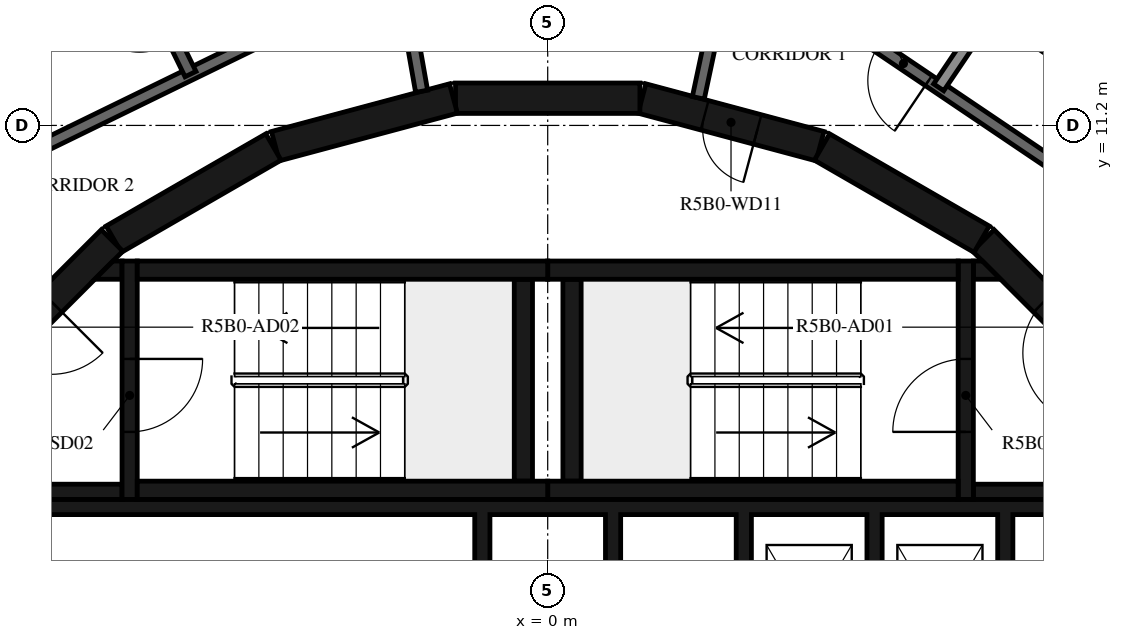
"""IFC4 building model, lengths in metres.
Left out: names, types, materials, properties, quantities, classifications, styles, units other than length and angle.
Written with IfcOpenShell. Run it as: python <this file> out.ifc"""

import sys

from ifc_helpers import new_model, si_unit, direction, frame, frame_2d, origin, place, context, subcontext, project, spatial, polyline, rectangle, outline, extrude, element, fill, save


model = new_model("IFC4")
c1 = context("Model", 3, precision=1e-05, world=origin(), true_north=direction((0.0, 1.0)))
c2 = subcontext(c1, "Body", "Model", "MODEL_VIEW")
j1 = project(units=[si_unit("LENGTHUNIT", "METRE"), si_unit("PLANEANGLEUNIT", "RADIAN")], contexts=[c1])
p1 = place(None, origin())
s1 = spatial("IfcSite", under=j1, at=p1, CompositionType="ELEMENT")
p2 = place(p1, origin())
s2 = spatial("IfcBuilding", under=s1, at=p2, CompositionType="ELEMENT")
p3 = place(p2, frame((0.0, 0.0, 202.4)))
s3 = spatial("IfcBuildingStorey", under=s2, at=p3, CompositionType="ELEMENT", Elevation=202.4)
p4 = place(p3, frame((9.308, 7.164, 0.0), z_axis=(0.0, 0.0, 1.0), x_axis=(-0.707106781187, 0.707106781187, 0.0)))
e1 = element("IfcWall", 1, at=p4, inside=s3, PredefinedType="SHEAR", context=c2, shape_type="SweptSolid", body=[
    extrude(rectangle(XDim=3.032, YDim=0.5, at=frame_2d((1.516, 0.0))), origin(), (0.0, 0.0, 1.0), 3.12),
])
p5 = place(p4, frame((0.416, 0.0, 0.0)))
e2 = element("IfcOpeningElement", 2, at=p5, cuts=e1, PredefinedType="OPENING", context=c2, shape_type="SweptSolid", body=[
    extrude(rectangle(XDim=1.2, YDim=2.1, at=frame_2d((0.6, 1.05))), frame((0.0, 0.26, 0.0), z_axis=(0.0, -1.0, 0.0), x_axis=(1.0, 0.0, 0.0)), (0.0, 0.0, 1.0), 0.52),
])
p6 = place(p3, frame((7.137, 9.329, 0.0), z_axis=(0.0, 0.0, 1.0), x_axis=(-0.865975092491, 0.500087131594, 0.0)))
e3 = element("IfcWall", 3, at=p6, inside=s3, PredefinedType="SHEAR", context=c2, shape_type="SweptSolid", body=[
    extrude(rectangle(XDim=3.033, YDim=0.5, at=frame_2d((1.516, 0.0))), origin(), (0.0, 0.0, 1.0), 3.12),
])
p7 = place(p3, frame((4.479, 10.858, 0.0), z_axis=(0.0, 0.0, 1.0), x_axis=(-0.965948410781, 0.258734743916, 0.0)))
e4 = element("IfcWall", 4, at=p7, inside=s3, PredefinedType="SHEAR", context=c2, shape_type="SweptSolid", body=[
    extrude(rectangle(XDim=3.033, YDim=0.5, at=frame_2d((1.516, 0.0))), origin(), (0.0, 0.0, 1.0), 3.12),
])
p8 = place(p7, frame((1.066, 0.0, 0.0)))
e5 = element("IfcOpeningElement", 5, at=p8, cuts=e4, PredefinedType="OPENING", context=c2, shape_type="SweptSolid", body=[
    extrude(rectangle(XDim=0.9, YDim=2.1, at=frame_2d((0.45, 1.05))), frame((0.0, 0.26, 0.0), z_axis=(0.0, -1.0, 0.0), x_axis=(1.0, 0.0, 0.0)), (0.0, 0.0, 1.0), 0.52),
])
for number, where, z_axis, x_axis in (
    (6, (1.516, 11.647, 0.0), (0.0, 0.0, 1.0), (-1.0, 0.0, 0.0)),
    (7, (-1.55, 11.643, 0.0), (0.0, 0.0, 1.0), (-0.966, -0.259, 0.0)),
    (8, (-4.51, 10.845, 0.0), (0.0, 0.0, 1.0), (-0.866, -0.5, 0.0)),
):
    element("IfcWall", number, at=place(p3, frame(where, z_axis=z_axis, x_axis=x_axis)), inside=s3, PredefinedType="SHEAR", context=c2, shape_type="SweptSolid", body=[
        extrude(rectangle(XDim=3.033, YDim=0.5, at=frame_2d((1.516, 0.0))), origin(), (0.0, 0.0, 1.0), 3.12),
    ])
p9 = place(p3, frame((-7.164, 9.308, 0.0), z_axis=(0.0, 0.0, 1.0), x_axis=(-0.707106781187, -0.707106781187, 0.0)))
e9 = element("IfcWall", 9, at=p9, inside=s3, PredefinedType="SHEAR", context=c2, shape_type="SweptSolid", body=[
    extrude(rectangle(XDim=3.032, YDim=0.5, at=frame_2d((1.516, 0.0))), origin(), (0.0, 0.0, 1.0), 3.12),
])
p10 = place(p9, frame((1.416, 0.0, 0.0)))
e10 = element("IfcOpeningElement", 10, at=p10, cuts=e9, PredefinedType="OPENING", context=c2, shape_type="SweptSolid", body=[
    extrude(rectangle(XDim=1.2, YDim=2.1, at=frame_2d((0.6, 1.05))), frame((0.0, 0.26, 0.0), z_axis=(0.0, -1.0, 0.0), x_axis=(1.0, 0.0, 0.0)), (0.0, 0.0, 1.0), 0.52),
])
for number, where, z_axis, x_axis in (
    (11, (0.0, 5.2, 0.0), (0.0, 0.0, 1.0), (1.0, 0.0, 0.0)),
    (12, (0.0, 8.82, 0.0), (0.0, 0.0, 1.0), (1.0, 0.0, 0.0)),
):
    element("IfcWall", number, at=place(p3, frame(where, z_axis=z_axis, x_axis=x_axis)), inside=s3, PredefinedType="SHEAR", context=c2, shape_type="SweptSolid", body=[
        extrude(rectangle(XDim=6.75, YDim=0.3, at=frame_2d((3.375, 0.0))), origin(), (0.0, 0.0, 1.0), 3.12),
    ])
p11 = place(p3, frame((0.4, 5.35, 0.0), z_axis=(0.0, 0.0, 1.0), x_axis=(0.0, 1.0, 0.0)))
e13 = element("IfcWall", 13, at=p11, inside=s3, PredefinedType="SHEAR", context=c2, shape_type="SweptSolid", body=[
    extrude(rectangle(XDim=3.32, YDim=0.3, at=frame_2d((1.66, 0.0))), origin(), (0.0, 0.0, 1.0), 3.12),
])
p12 = place(p3, frame((6.875, 5.05, 0.0), z_axis=(0.0, 0.0, 1.0), x_axis=(0.0, 1.0, 0.0)))
e14 = element("IfcWall", 14, at=p12, inside=s3, PredefinedType="SHEAR", context=c2, shape_type="SweptSolid", body=[
    extrude(rectangle(XDim=3.92, YDim=0.25, at=frame_2d((1.96, 0.0))), origin(), (0.0, 0.0, 1.0), 3.12),
])
p13 = place(p12, frame((1.11, 0.0, 0.0)))
e15 = element("IfcOpeningElement", 15, at=p13, cuts=e14, PredefinedType="OPENING", context=c2, shape_type="SweptSolid", body=[
    extrude(rectangle(XDim=1.2, YDim=2.1, at=frame_2d((0.6, 1.05))), frame((0.0, 0.135, 0.0), z_axis=(0.0, -1.0, 0.0), x_axis=(1.0, 0.0, 0.0)), (0.0, 0.0, 1.0), 0.27),
])
p14 = place(p3, frame((7.0, 5.175, 0.0), z_axis=(0.0, 0.0, 1.0), x_axis=(1.0, 0.0, 0.0)))
e16 = element("IfcWall", 16, at=p14, inside=s3, PredefinedType="SHEAR", context=c2, shape_type="SweptSolid", body=[
    extrude(rectangle(XDim=3.1, YDim=0.25, at=frame_2d((1.55, 0.0))), origin(), (0.0, 0.0, 1.0), 3.12),
])
p15 = place(p3, origin())
e17 = element("IfcWall", 17, at=p15, inside=s3, PredefinedType="SHEAR", context=c2, shape_type="SweptSolid", body=[
    extrude(outline(polyline([(7.448, 8.67), (7.0, 8.67), (7.0, 8.97), (7.148, 8.97), (7.448, 8.67)])), origin(), (0.0, 0.0, 1.0), 3.12),
])
for number, where, z_axis, x_axis in (
    (18, (-6.75, 5.2, 0.0), (0.0, 0.0, 1.0), (1.0, 0.0, 0.0)),
    (19, (-6.75, 8.82, 0.0), (0.0, 0.0, 1.0), (1.0, 0.0, 0.0)),
):
    element("IfcWall", number, at=place(p3, frame(where, z_axis=z_axis, x_axis=x_axis)), inside=s3, PredefinedType="SHEAR", context=c2, shape_type="SweptSolid", body=[
        extrude(rectangle(XDim=6.75, YDim=0.3, at=frame_2d((3.375, 0.0))), origin(), (0.0, 0.0, 1.0), 3.12),
    ])
p16 = place(p3, frame((-0.4, 5.35, 0.0), z_axis=(0.0, 0.0, 1.0), x_axis=(0.0, 1.0, 0.0)))
e20 = element("IfcWall", 20, at=p16, inside=s3, PredefinedType="SHEAR", context=c2, shape_type="SweptSolid", body=[
    extrude(rectangle(XDim=3.32, YDim=0.3, at=frame_2d((1.66, 0.0))), origin(), (0.0, 0.0, 1.0), 3.12),
])
p17 = place(p3, frame((-6.875, 8.97, 0.0), z_axis=(0.0, 0.0, 1.0), x_axis=(0.0, -1.0, 0.0)))
e21 = element("IfcWall", 21, at=p17, inside=s3, PredefinedType="SHEAR", context=c2, shape_type="SweptSolid", body=[
    extrude(rectangle(XDim=3.92, YDim=0.25, at=frame_2d((1.96, 0.0))), origin(), (0.0, 0.0, 1.0), 3.12),
])
p18 = place(p17, frame((1.61, 0.0, 0.0)))
e22 = element("IfcOpeningElement", 22, at=p18, cuts=e21, PredefinedType="OPENING", context=c2, shape_type="SweptSolid", body=[
    extrude(rectangle(XDim=1.2, YDim=2.1, at=frame_2d((0.6, 1.05))), frame((0.0, 0.135, 0.0), z_axis=(0.0, -1.0, 0.0), x_axis=(1.0, 0.0, 0.0)), (0.0, 0.0, 1.0), 0.27),
])
p19 = place(p3, frame((-7.0, 5.175, 0.0), z_axis=(0.0, 0.0, 1.0), x_axis=(-1.0, 0.0, 0.0)))
e23 = element("IfcWall", 23, at=p19, inside=s3, PredefinedType="SHEAR", context=c2, shape_type="SweptSolid", body=[
    extrude(rectangle(XDim=3.1, YDim=0.25, at=frame_2d((1.55, 0.0))), origin(), (0.0, 0.0, 1.0), 3.12),
])
p20 = place(p3, origin())
e24 = element("IfcWall", 24, at=p20, inside=s3, PredefinedType="SHEAR", context=c2, shape_type="SweptSolid", body=[
    extrude(outline(polyline([(-7.148, 8.97), (-7.0, 8.97), (-7.0, 8.67), (-7.448, 8.67), (-7.148, 8.97)])), origin(), (0.0, 0.0, 1.0), 3.12),
])
p21 = place(p3, origin())
e25 = element("IfcWall", 25, at=p21, inside=s3, PredefinedType="SHEAR", context=c2, shape_type="SweptSolid", body=[
    extrude(outline(polyline([(-9.55, 4.8), (-1.2, 4.8), (-1.2, 1.9), (-0.95, 1.9), (-0.95, 4.8), (0.95, 4.8), (0.95, 1.9), (1.2, 1.9), (1.2, 4.8), (3.1, 4.8), (3.1, 1.9), (3.35, 1.9), (3.35, 4.8), (5.25, 4.8), (5.25, 1.9), (5.5, 1.9), (5.5, 4.8), (7.4, 4.8), (7.4, 1.9), (7.65, 1.9), (7.65, 4.8), (9.55, 4.8), (9.55, 1.9), (9.8, 1.9), (9.8, 4.8), (9.8, 5.05), (-9.8, 5.05), (-9.8, 4.8), (-9.8, 1.9), (-9.55, 1.9), (-9.55, 4.8)])), origin(), (0.0, 0.0, 1.0), 3.12),
])
p22 = place(p3, frame((10.47, 9.101, 0.0), z_axis=(0.0, 0.0, 1.0), x_axis=(-0.829035841718, 0.559195469534, 0.0)))
e26 = element("IfcWall", 26, at=p22, inside=s3, PredefinedType="STANDARD", context=c2, shape_type="SweptSolid", body=[
    extrude(rectangle(XDim=7.181, YDim=0.2, at=frame_2d((3.591, 0.0))), origin(), (0.0, 0.0, 1.0), 3.12),
])
p23 = place(p22, frame((0.2, 0.0, 0.0)))
e27 = element("IfcOpeningElement", 27, at=p23, cuts=e26, PredefinedType="OPENING", context=c2, shape_type="SweptSolid", body=[
    extrude(rectangle(XDim=1.0, YDim=2.1, at=frame_2d((0.5, 1.05))), frame((0.0, 0.11, 0.0), z_axis=(0.0, -1.0, 0.0), x_axis=(1.0, 0.0, 0.0)), (0.0, 0.0, 1.0), 0.22),
])
p24 = place(p22, frame((5.073, 0.0, 0.0)))
e28 = element("IfcOpeningElement", 28, at=p24, cuts=e26, PredefinedType="OPENING", context=c2, shape_type="SweptSolid", body=[
    extrude(rectangle(XDim=1.0, YDim=2.1, at=frame_2d((0.5, 1.05))), frame((0.0, 0.11, 0.0), z_axis=(0.0, -1.0, 0.0), x_axis=(1.0, 0.0, 0.0)), (0.0, 0.0, 1.0), 0.22),
])
p25 = place(p3, frame((2.813, 13.236, 0.0), z_axis=(0.0, 0.0, 1.0), x_axis=(-0.207911086063, -0.978147729278, 0.0)))
e29 = element("IfcWall", 29, at=p25, inside=s3, PredefinedType="STANDARD", context=c2, shape_type="SweptSolid", body=[
    extrude(rectangle(XDim=1.618, YDim=0.2, at=frame_2d((0.809, 0.0))), origin(), (0.0, 0.0, 1.0), 3.12),
])
p26 = place(p3, frame((-2.074, 11.761, 0.0), z_axis=(0.0, 0.0, 1.0), x_axis=(-0.173740587112, 0.984791454263, 0.0)))
e30 = element("IfcWall", 30, at=p26, inside=s3, PredefinedType="STANDARD", context=c2, shape_type="SweptSolid", body=[
    extrude(rectangle(XDim=1.867, YDim=0.2, at=frame_2d((0.934, 0.0))), origin(), (0.0, 0.0, 1.0), 3.12),
])
p27 = place(p3, frame((-2.647, 13.618, 0.0), z_axis=(0.0, 0.0, 1.0), x_axis=(-0.898796543751, -0.438366026218, 0.0)))
e31 = element("IfcWall", 31, at=p27, inside=s3, PredefinedType="STANDARD", context=c2, shape_type="SweptSolid", body=[
    extrude(rectangle(XDim=7.181, YDim=0.2, at=frame_2d((3.591, 0.0))), origin(), (0.0, 0.0, 1.0), 3.12),
])
p28 = place(p3, frame((9.104, 15.79, 0.0), z_axis=(0.0, 0.0, 1.0), x_axis=(-0.559193912135, -0.829036892201, 0.0)))
e32 = element("IfcWall", 32, at=p28, inside=s3, PredefinedType="STANDARD", context=c2, shape_type="SweptSolid", body=[
    extrude(rectangle(XDim=4.781, YDim=0.2, at=frame_2d((2.39, 0.0))), origin(), (0.0, 0.0, 1.0), 2.73),
])
p29 = place(p3, frame((-8.042, 16.489, 0.0), z_axis=(0.0, 0.0, 1.0), x_axis=(0.438345825707, -0.898806395774, 0.0)))
e33 = element("IfcWall", 33, at=p29, inside=s3, PredefinedType="STANDARD", context=c2, shape_type="SweptSolid", body=[
    extrude(rectangle(XDim=4.946, YDim=0.2, at=frame_2d((2.473, 0.0))), origin(), (0.0, 0.0, 1.0), 3.12),
])
p30 = place(p3, frame((11.642, 10.12, 0.0), z_axis=(0.0, 0.0, 1.0), x_axis=(-0.829032241779, 0.55920080659, 0.0)))
e34 = element("IfcWall", 34, at=p30, inside=s3, PredefinedType="PARTITIONING", context=c2, shape_type="SweptSolid", body=[
    extrude(rectangle(XDim=7.985, YDim=0.12, at=frame_2d((3.992, 0.0))), origin(), (0.0, 0.0, 1.0), 3.12),
])
p31 = place(p30, frame((0.2, 0.0, 0.0)))
e35 = element("IfcOpeningElement", 35, at=p31, cuts=e34, PredefinedType="OPENING", context=c2, shape_type="SweptSolid", body=[
    extrude(rectangle(XDim=0.9, YDim=2.1, at=frame_2d((0.45, 1.05))), frame((0.0, 0.07, 0.0), z_axis=(0.0, -1.0, 0.0), x_axis=(1.0, 0.0, 0.0)), (0.0, 0.0, 1.0), 0.14),
])
p32 = place(p30, frame((5.475, 0.0, 0.0)))
e36 = element("IfcOpeningElement", 36, at=p32, cuts=e34, PredefinedType="OPENING", context=c2, shape_type="SweptSolid", body=[
    extrude(rectangle(XDim=0.9, YDim=2.1, at=frame_2d((0.45, 1.05))), frame((0.0, 0.07, 0.0), z_axis=(0.0, -1.0, 0.0), x_axis=(1.0, 0.0, 0.0)), (0.0, 0.0, 1.0), 0.14),
])
p33 = place(p3, frame((-6.532, 13.392, 0.0), z_axis=(0.0, 0.0, 1.0), x_axis=(-0.898786663593, -0.438386283256, 0.0)))
e37 = element("IfcWall", 37, at=p33, inside=s3, PredefinedType="PARTITIONING", context=c2, shape_type="SweptSolid", body=[
    extrude(rectangle(XDim=3.992, YDim=0.12, at=frame_2d((1.996, 0.0))), origin(), (0.0, 0.0, 1.0), 3.12),
])
p34 = place(p33, frame((0.2, 0.0, 0.0)))
e38 = element("IfcOpeningElement", 38, at=p34, cuts=e37, PredefinedType="OPENING", context=c2, shape_type="SweptSolid", body=[
    extrude(rectangle(XDim=0.9, YDim=2.1, at=frame_2d((0.45, 1.05))), frame((0.0, 0.07, 0.0), z_axis=(0.0, -1.0, 0.0), x_axis=(1.0, 0.0, 0.0)), (0.0, 0.0, 1.0), 0.14),
])
p35 = place(p13, origin())
e39 = element("IfcDoor", 39, at=p35, inside=s3, OperationType="SINGLE_SWING_LEFT", PredefinedType="DOOR", context=c2, shape_type="SweptSolid", body=[
    extrude(rectangle(XDim=1.2, YDim=2.1, at=frame_2d((0.6, 1.05))), frame((0.0, 0.025, 0.0), z_axis=(0.0, -1.0, 0.0), x_axis=(1.0, 0.0, 0.0)), (0.0, 0.0, 1.0), 0.05),
])
fill(e15, e39)
p36 = place(p5, origin())
e40 = element("IfcDoor", 40, at=p36, inside=s3, OperationType="SINGLE_SWING_RIGHT", PredefinedType="DOOR", context=c2, shape_type="SweptSolid", body=[
    extrude(rectangle(XDim=1.2, YDim=2.1, at=frame_2d((0.6, 1.05))), frame((0.0, 0.025, 0.0), z_axis=(0.0, -1.0, 0.0), x_axis=(1.0, 0.0, 0.0)), (0.0, 0.0, 1.0), 0.05),
])
fill(e2, e40)
p37 = place(p18, origin())
e41 = element("IfcDoor", 41, at=p37, inside=s3, OperationType="SINGLE_SWING_LEFT", PredefinedType="DOOR", context=c2, shape_type="SweptSolid", body=[
    extrude(rectangle(XDim=1.2, YDim=2.1, at=frame_2d((0.6, 1.05))), frame((0.0, 0.025, 0.0), z_axis=(0.0, -1.0, 0.0), x_axis=(1.0, 0.0, 0.0)), (0.0, 0.0, 1.0), 0.05),
])
fill(e22, e41)
p38 = place(p10, origin())
e42 = element("IfcDoor", 42, at=p38, inside=s3, OperationType="SINGLE_SWING_RIGHT", PredefinedType="DOOR", context=c2, shape_type="SweptSolid", body=[
    extrude(rectangle(XDim=1.2, YDim=2.1, at=frame_2d((0.6, 1.05))), frame((0.0, 0.025, 0.0), z_axis=(0.0, -1.0, 0.0), x_axis=(1.0, 0.0, 0.0)), (0.0, 0.0, 1.0), 0.05),
])
fill(e10, e42)
p39 = place(p8, origin())
e43 = element("IfcDoor", 43, at=p39, inside=s3, OperationType="SINGLE_SWING_LEFT", PredefinedType="DOOR", context=c2, shape_type="SweptSolid", body=[
    extrude(rectangle(XDim=0.9, YDim=2.1, at=frame_2d((0.45, 1.05))), frame((0.0, 0.025, 0.0), z_axis=(0.0, -1.0, 0.0), x_axis=(1.0, 0.0, 0.0)), (0.0, 0.0, 1.0), 0.05),
])
fill(e5, e43)
p40 = place(p24, origin())
e44 = element("IfcDoor", 44, at=p40, inside=s3, OperationType="SINGLE_SWING_RIGHT", PredefinedType="DOOR", context=c2, shape_type="SweptSolid", body=[
    extrude(rectangle(XDim=1.0, YDim=2.1, at=frame_2d((0.5, 1.05))), frame((0.0, 0.025, 0.0), z_axis=(0.0, -1.0, 0.0), x_axis=(1.0, 0.0, 0.0)), (0.0, 0.0, 1.0), 0.05),
])
fill(e28, e44)
save(model, sys.argv[1])
